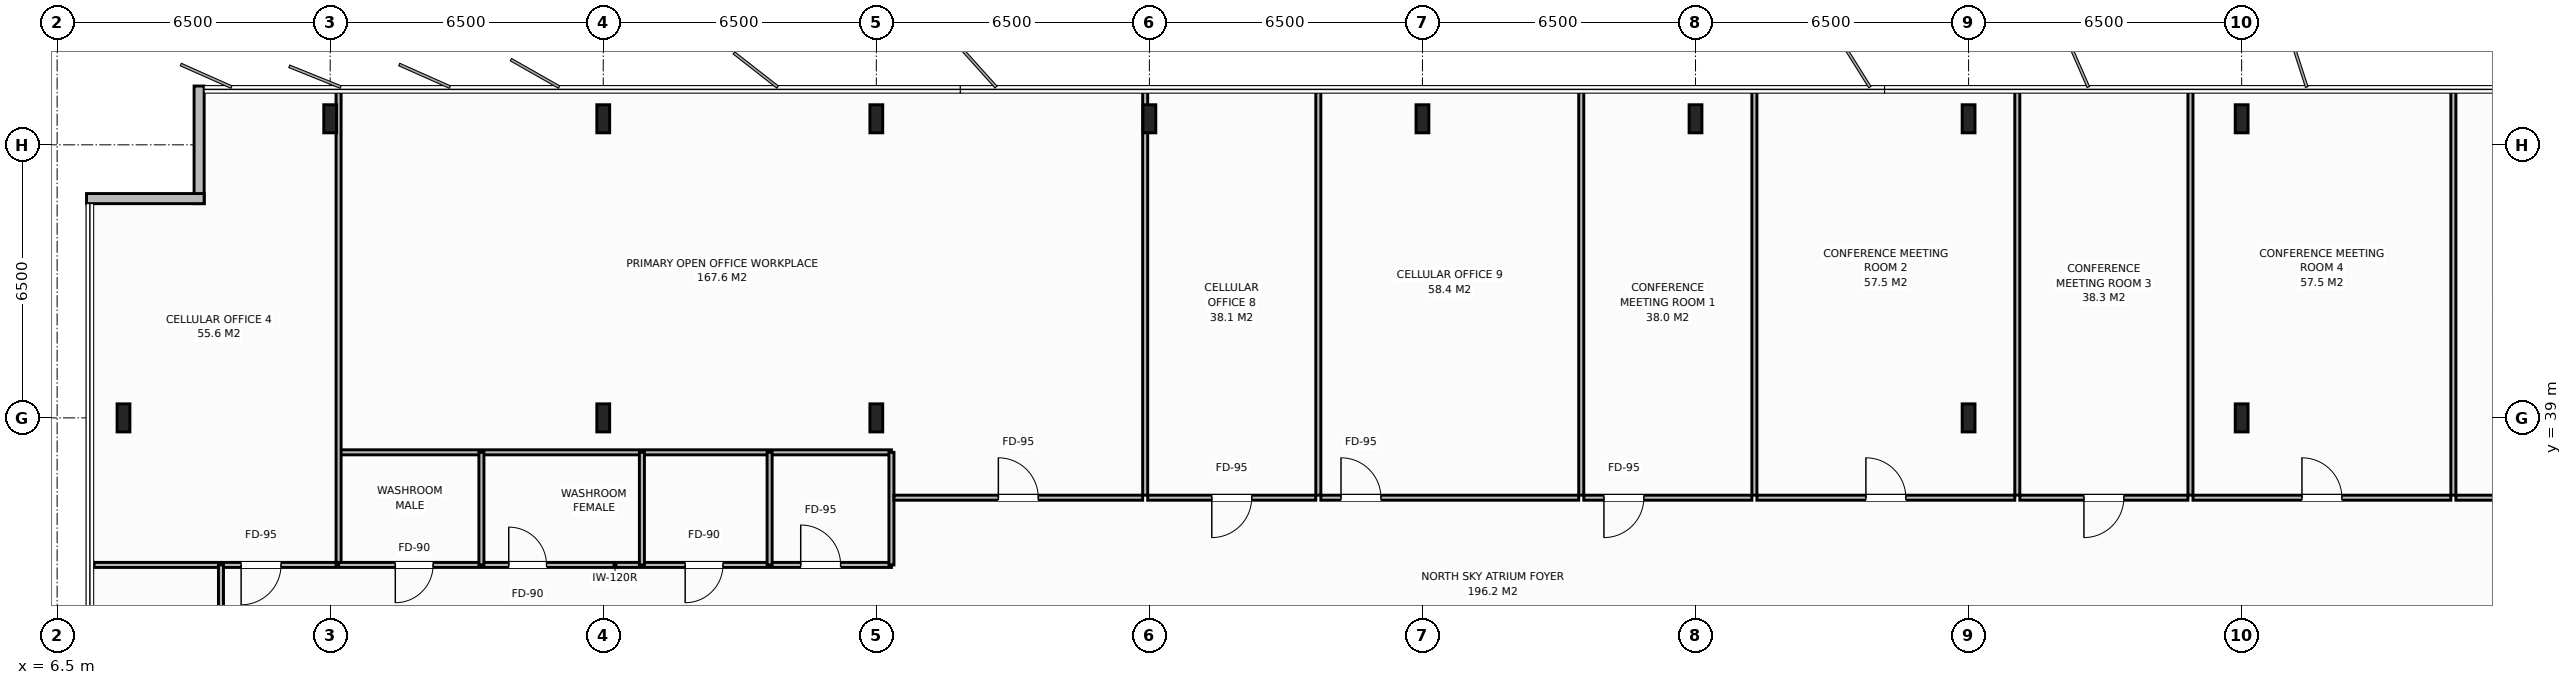
"""IFC4 building model, lengths in metres.
Left out: names, types, materials, properties, quantities, classifications, styles, units other than length and angle.
Written with IfcOpenShell. Run it as: python <this file> out.ifc"""

import sys

from ifc_helpers import new_model, si_unit, direction, frame, frame_2d, origin, origin_2d, place, context, subcontext, project, spatial, rectangle, i_section, extrude, element, fill, save


model = new_model("IFC4")
c1 = context("Model", 3, precision=1e-05, world=origin(), true_north=direction((0.0, 1.0)))
c2 = subcontext(c1, "Body", "Model", "MODEL_VIEW")
j1 = project(units=[si_unit("LENGTHUNIT", "METRE"), si_unit("PLANEANGLEUNIT", "RADIAN")], contexts=[c1])
p1 = place(None, origin())
s1 = spatial("IfcSite", under=j1, at=p1, CompositionType="ELEMENT")
p2 = place(p1, origin())
s2 = spatial("IfcBuilding", under=s1, at=p2, CompositionType="ELEMENT")
p3 = place(p2, frame((0.0, 0.0, 306.4)))
s3 = spatial("IfcBuildingStorey", under=s2, at=p3, CompositionType="ELEMENT", Elevation=306.4)
for number, where, z_axis, x_axis in (
    (1, (19.5, 39.0, 0.0), (0.0, 0.0, 1.0), (1.0, 0.0, 0.0)),
    (2, (58.5, 39.0, 0.0), (0.0, 0.0, 1.0), (1.0, 0.0, 0.0)),
    (3, (26.0, 39.0, 0.0), (0.0, 0.0, 1.0), (1.0, 0.0, 0.0)),
    (4, (52.0, 39.0, 0.0), (0.0, 0.0, 1.0), (1.0, 0.0, 0.0)),
    (5, (13.0, 46.12, 0.0), (0.0, 0.0, 1.0), (1.0, 0.0, 0.0)),
    (6, (19.5, 46.12, 0.0), (0.0, 0.0, 1.0), (1.0, 0.0, 0.0)),
    (7, (26.0, 46.12, 0.0), (0.0, 0.0, 1.0), (1.0, 0.0, 0.0)),
    (8, (32.5, 46.12, 0.0), (0.0, 0.0, 1.0), (1.0, 0.0, 0.0)),
    (9, (39.0, 46.12, 0.0), (0.0, 0.0, 1.0), (1.0, 0.0, 0.0)),
    (10, (45.5, 46.12, 0.0), (0.0, 0.0, 1.0), (1.0, 0.0, 0.0)),
    (11, (52.0, 46.12, 0.0), (0.0, 0.0, 1.0), (1.0, 0.0, 0.0)),
    (12, (58.5, 46.12, 0.0), (0.0, 0.0, 1.0), (1.0, 0.0, 0.0)),
    (13, (8.08, 39.0, 0.0), (0.0, 0.0, 1.0), (1.0, 0.0, 0.0)),
):
    element("IfcColumn", number, at=place(p3, frame(where, z_axis=z_axis, x_axis=x_axis)), inside=s3, PredefinedType="COLUMN", context=c2, shape_type="SweptSolid", body=[
        extrude(i_section(OverallWidth=0.305, OverallDepth=0.668, WebThickness=0.021, FlangeThickness=0.04, at=origin_2d()), origin(), (0.0, 0.0, 1.0), 4.0),
    ])
p4 = place(p3, frame((9.88, 44.1, 0.0), z_axis=(0.0, 0.0, 1.0), x_axis=(0.0, 1.0, 0.0)))
e14 = element("IfcWall", 14, at=p4, inside=s3, PredefinedType="STANDARD", context=c2, shape_type="SweptSolid", body=[
    extrude(rectangle(XDim=2.8, YDim=0.24, at=frame_2d((1.4, 0.0))), origin(), (0.0, 0.0, 1.0), 3.72),
])
p5 = place(p3, frame((7.2, 44.22, 0.0), z_axis=(0.0, 0.0, 1.0), x_axis=(1.0, 0.0, 0.0)))
e15 = element("IfcWall", 15, at=p5, inside=s3, PredefinedType="STANDARD", context=c2, shape_type="SweptSolid", body=[
    extrude(rectangle(XDim=2.8, YDim=0.24, at=frame_2d((1.4, 0.0))), origin(), (0.0, 0.0, 1.0), 3.72),
])
p6 = place(p3, frame((13.2, 35.5, 0.0), z_axis=(0.0, 0.0, 1.0), x_axis=(1.0, 0.0, 0.0)))
e16 = element("IfcWall", 16, at=p6, inside=s3, PredefinedType="PARTITIONING", context=c2, shape_type="SweptSolid", body=[
    extrude(rectangle(XDim=13.16, YDim=0.12, at=frame_2d((6.58, 0.0))), origin(), (0.0, 0.0, 1.0), 3.72),
])
p7 = place(p6, frame((1.35, 0.0, 0.0)))
e17 = element("IfcOpeningElement", 17, at=p7, cuts=e16, PredefinedType="OPENING", context=c2, shape_type="SweptSolid", body=[
    extrude(rectangle(XDim=0.9, YDim=2.15, at=frame_2d((0.45, 1.075))), frame((0.0, 0.07, 0.0), z_axis=(0.0, -1.0, 0.0), x_axis=(1.0, 0.0, 0.0)), (0.0, 0.0, 1.0), 0.14),
])
p8 = place(p6, frame((4.05, 0.0, 0.0)))
e18 = element("IfcOpeningElement", 18, at=p8, cuts=e16, PredefinedType="OPENING", context=c2, shape_type="SweptSolid", body=[
    extrude(rectangle(XDim=0.9, YDim=2.15, at=frame_2d((0.45, 1.075))), frame((0.0, 0.07, 0.0), z_axis=(0.0, -1.0, 0.0), x_axis=(1.0, 0.0, 0.0)), (0.0, 0.0, 1.0), 0.14),
])
p9 = place(p6, frame((8.25, 0.0, 0.0)))
e19 = element("IfcOpeningElement", 19, at=p9, cuts=e16, PredefinedType="OPENING", context=c2, shape_type="SweptSolid", body=[
    extrude(rectangle(XDim=0.9, YDim=2.15, at=frame_2d((0.45, 1.075))), frame((0.0, 0.07, 0.0), z_axis=(0.0, -1.0, 0.0), x_axis=(1.0, 0.0, 0.0)), (0.0, 0.0, 1.0), 0.14),
])
p10 = place(p6, frame((11.0, 0.0, 0.0)))
e20 = element("IfcOpeningElement", 20, at=p10, cuts=e16, PredefinedType="OPENING", context=c2, shape_type="SweptSolid", body=[
    extrude(rectangle(XDim=0.95, YDim=2.15, at=frame_2d((0.475, 1.075))), frame((0.0, 0.07, 0.0), z_axis=(0.0, -1.0, 0.0), x_axis=(1.0, 0.0, 0.0)), (0.0, 0.0, 1.0), 0.14),
])
p11 = place(p3, frame((13.2, 38.18, 0.0), z_axis=(0.0, 0.0, 1.0), x_axis=(1.0, 0.0, 0.0)))
e21 = element("IfcWall", 21, at=p11, inside=s3, PredefinedType="PARTITIONING", context=c2, shape_type="SweptSolid", body=[
    extrude(rectangle(XDim=13.16, YDim=0.12, at=frame_2d((6.58, 0.0))), origin(), (0.0, 0.0, 1.0), 3.72),
])
for number, where, z_axis, x_axis in (
    (22, (16.6, 35.5, 0.0), (0.0, 0.0, 1.0), (0.0, 1.0, 0.0)),
    (23, (20.42, 35.5, 0.0), (0.0, 0.0, 1.0), (0.0, 1.0, 0.0)),
    (24, (23.46, 35.5, 0.0), (0.0, 0.0, 1.0), (0.0, 1.0, 0.0)),
    (25, (26.36, 35.5, 0.0), (0.0, 0.0, 1.0), (0.0, 1.0, 0.0)),
):
    element("IfcWall", number, at=place(p3, frame(where, z_axis=z_axis, x_axis=x_axis)), inside=s3, PredefinedType="PARTITIONING", context=c2, shape_type="SweptSolid", body=[
        extrude(rectangle(XDim=2.68, YDim=0.12, at=frame_2d((1.34, 0.0))), origin(), (0.0, 0.0, 1.0), 3.72),
    ])
p12 = place(p3, frame((13.2, 35.56, 0.0), z_axis=(0.0, 0.0, 1.0), x_axis=(0.0, 1.0, 0.0)))
e26 = element("IfcWall", 26, at=p12, inside=s3, PredefinedType="PARTITIONING", context=c2, shape_type="SweptSolid", body=[
    extrude(rectangle(XDim=11.32, YDim=0.12, at=frame_2d((5.66, 0.0))), origin(), (0.0, 0.0, 1.0), 2.712),
])
p13 = place(p3, frame((7.38, 35.5, 0.0), z_axis=(0.0, 0.0, 1.0), x_axis=(1.0, 0.0, 0.0)))
e27 = element("IfcWall", 27, at=p13, inside=s3, PredefinedType="PARTITIONING", context=c2, shape_type="SweptSolid", body=[
    extrude(rectangle(XDim=5.76, YDim=0.12, at=frame_2d((2.88, 0.0))), origin(), (0.0, 0.0, 1.0), 3.72),
])
p14 = place(p13, frame((3.5, 0.0, 0.0)))
e28 = element("IfcOpeningElement", 28, at=p14, cuts=e27, PredefinedType="OPENING", context=c2, shape_type="SweptSolid", body=[
    extrude(rectangle(XDim=0.95, YDim=2.15, at=frame_2d((0.475, 1.075))), frame((0.0, 0.07, 0.0), z_axis=(0.0, -1.0, 0.0), x_axis=(1.0, 0.0, 0.0)), (0.0, 0.0, 1.0), 0.14),
])
p15 = place(p3, frame((32.4, 37.16, 0.0), z_axis=(0.0, 0.0, 1.0), x_axis=(0.0, 1.0, 0.0)))
e29 = element("IfcWall", 29, at=p15, inside=s3, PredefinedType="PARTITIONING", context=c2, shape_type="SweptSolid", body=[
    extrude(rectangle(XDim=9.72, YDim=0.12, at=frame_2d((4.86, 0.0))), origin(), (0.0, 0.0, 1.0), 2.712),
])
p16 = place(p3, frame((26.42, 37.1, 0.0), z_axis=(0.0, 0.0, 1.0), x_axis=(1.0, 0.0, 0.0)))
e30 = element("IfcWall", 30, at=p16, inside=s3, PredefinedType="PARTITIONING", context=c2, shape_type="SweptSolid", body=[
    extrude(rectangle(XDim=5.92, YDim=0.12, at=frame_2d((2.96, 0.0))), origin(), (0.0, 0.0, 1.0), 3.72),
])
p17 = place(p16, frame((2.485, 0.0, 0.0)))
e31 = element("IfcOpeningElement", 31, at=p17, cuts=e30, PredefinedType="OPENING", context=c2, shape_type="SweptSolid", body=[
    extrude(rectangle(XDim=0.95, YDim=2.15, at=frame_2d((0.475, 1.075))), frame((0.0, 0.07, 0.0), z_axis=(0.0, -1.0, 0.0), x_axis=(1.0, 0.0, 0.0)), (0.0, 0.0, 1.0), 0.14),
])
p18 = place(p3, frame((36.521, 37.16, 0.0), z_axis=(0.0, 0.0, 1.0), x_axis=(0.0, 1.0, 0.0)))
e32 = element("IfcWall", 32, at=p18, inside=s3, PredefinedType="PARTITIONING", context=c2, shape_type="SweptSolid", body=[
    extrude(rectangle(XDim=9.72, YDim=0.12, at=frame_2d((4.86, 0.0))), origin(), (0.0, 0.0, 1.0), 3.72),
])
p19 = place(p3, frame((32.46, 37.1, 0.0), z_axis=(0.0, 0.0, 1.0), x_axis=(1.0, 0.0, 0.0)))
e33 = element("IfcWall", 33, at=p19, inside=s3, PredefinedType="PARTITIONING", context=c2, shape_type="SweptSolid", body=[
    extrude(rectangle(XDim=4.001, YDim=0.12, at=frame_2d((2.001, 0.0))), origin(), (0.0, 0.0, 1.0), 3.72),
])
p20 = place(p19, frame((1.526, 0.0, 0.0)))
e34 = element("IfcOpeningElement", 34, at=p20, cuts=e33, PredefinedType="OPENING", context=c2, shape_type="SweptSolid", body=[
    extrude(rectangle(XDim=0.95, YDim=2.15, at=frame_2d((0.475, 1.075))), frame((0.0, 0.07, 0.0), z_axis=(0.0, -1.0, 0.0), x_axis=(1.0, 0.0, 0.0)), (0.0, 0.0, 1.0), 0.14),
])
p21 = place(p3, frame((42.78, 37.16, 0.0), z_axis=(0.0, 0.0, 1.0), x_axis=(0.0, 1.0, 0.0)))
e35 = element("IfcWall", 35, at=p21, inside=s3, PredefinedType="PARTITIONING", context=c2, shape_type="SweptSolid", body=[
    extrude(rectangle(XDim=9.72, YDim=0.12, at=frame_2d((4.86, 0.0))), origin(), (0.0, 0.0, 1.0), 3.72),
])
p22 = place(p3, frame((36.582, 37.1, 0.0), z_axis=(0.0, 0.0, 1.0), x_axis=(1.0, 0.0, 0.0)))
e36 = element("IfcWall", 36, at=p22, inside=s3, PredefinedType="PARTITIONING", context=c2, shape_type="SweptSolid", body=[
    extrude(rectangle(XDim=6.138, YDim=0.12, at=frame_2d((3.069, 0.0))), origin(), (0.0, 0.0, 1.0), 3.72),
])
p23 = place(p22, frame((0.48, 0.0, 0.0)))
e37 = element("IfcOpeningElement", 37, at=p23, cuts=e36, PredefinedType="OPENING", context=c2, shape_type="SweptSolid", body=[
    extrude(rectangle(XDim=0.95, YDim=2.15, at=frame_2d((0.475, 1.075))), frame((0.0, 0.07, 0.0), z_axis=(0.0, -1.0, 0.0), x_axis=(1.0, 0.0, 0.0)), (0.0, 0.0, 1.0), 0.14),
])
p24 = place(p3, frame((46.902, 37.16, 0.0), z_axis=(0.0, 0.0, 1.0), x_axis=(0.0, 1.0, 0.0)))
e38 = element("IfcWall", 38, at=p24, inside=s3, PredefinedType="PARTITIONING", context=c2, shape_type="SweptSolid", body=[
    extrude(rectangle(XDim=9.72, YDim=0.12, at=frame_2d((4.86, 0.0))), origin(), (0.0, 0.0, 1.0), 3.72),
])
p25 = place(p3, frame((42.84, 37.1, 0.0), z_axis=(0.0, 0.0, 1.0), x_axis=(1.0, 0.0, 0.0)))
e39 = element("IfcWall", 39, at=p25, inside=s3, PredefinedType="PARTITIONING", context=c2, shape_type="SweptSolid", body=[
    extrude(rectangle(XDim=4.001, YDim=0.12, at=frame_2d((2.001, 0.0))), origin(), (0.0, 0.0, 1.0), 3.72),
])
p26 = place(p25, frame((0.48, 0.0, 0.0)))
e40 = element("IfcOpeningElement", 40, at=p26, cuts=e39, PredefinedType="OPENING", context=c2, shape_type="SweptSolid", body=[
    extrude(rectangle(XDim=0.95, YDim=2.15, at=frame_2d((0.475, 1.075))), frame((0.0, 0.07, 0.0), z_axis=(0.0, -1.0, 0.0), x_axis=(1.0, 0.0, 0.0)), (0.0, 0.0, 1.0), 0.14),
])
p27 = place(p3, frame((53.16, 37.16, 0.0), z_axis=(0.0, 0.0, 1.0), x_axis=(0.0, 1.0, 0.0)))
e41 = element("IfcWall", 41, at=p27, inside=s3, PredefinedType="PARTITIONING", context=c2, shape_type="SweptSolid", body=[
    extrude(rectangle(XDim=9.72, YDim=0.12, at=frame_2d((4.86, 0.0))), origin(), (0.0, 0.0, 1.0), 3.72),
])
p28 = place(p3, frame((46.961, 37.1, 0.0), z_axis=(0.0, 0.0, 1.0), x_axis=(1.0, 0.0, 0.0)))
e42 = element("IfcWall", 42, at=p28, inside=s3, PredefinedType="PARTITIONING", context=c2, shape_type="SweptSolid", body=[
    extrude(rectangle(XDim=6.139, YDim=0.12, at=frame_2d((3.069, 0.0))), origin(), (0.0, 0.0, 1.0), 3.72),
])
p29 = place(p28, frame((2.594, 0.0, 0.0)))
e43 = element("IfcOpeningElement", 43, at=p29, cuts=e42, PredefinedType="OPENING", context=c2, shape_type="SweptSolid", body=[
    extrude(rectangle(XDim=0.95, YDim=2.15, at=frame_2d((0.475, 1.075))), frame((0.0, 0.07, 0.0), z_axis=(0.0, -1.0, 0.0), x_axis=(1.0, 0.0, 0.0)), (0.0, 0.0, 1.0), 0.14),
])
p30 = place(p3, frame((57.281, 37.16, 0.0), z_axis=(0.0, 0.0, 1.0), x_axis=(0.0, 1.0, 0.0)))
e44 = element("IfcWall", 44, at=p30, inside=s3, PredefinedType="PARTITIONING", context=c2, shape_type="SweptSolid", body=[
    extrude(rectangle(XDim=9.72, YDim=0.12, at=frame_2d((4.86, 0.0))), origin(), (0.0, 0.0, 1.0), 3.72),
])
p31 = place(p3, frame((53.22, 37.1, 0.0), z_axis=(0.0, 0.0, 1.0), x_axis=(1.0, 0.0, 0.0)))
e45 = element("IfcWall", 45, at=p31, inside=s3, PredefinedType="PARTITIONING", context=c2, shape_type="SweptSolid", body=[
    extrude(rectangle(XDim=4.001, YDim=0.12, at=frame_2d((2.001, 0.0))), origin(), (0.0, 0.0, 1.0), 3.72),
])
p32 = place(p31, frame((1.526, 0.0, 0.0)))
e46 = element("IfcOpeningElement", 46, at=p32, cuts=e45, PredefinedType="OPENING", context=c2, shape_type="SweptSolid", body=[
    extrude(rectangle(XDim=0.95, YDim=2.15, at=frame_2d((0.475, 1.075))), frame((0.0, 0.07, 0.0), z_axis=(0.0, -1.0, 0.0), x_axis=(1.0, 0.0, 0.0)), (0.0, 0.0, 1.0), 0.14),
])
p33 = place(p3, frame((63.54, 37.16, 0.0), z_axis=(0.0, 0.0, 1.0), x_axis=(0.0, 1.0, 0.0)))
e47 = element("IfcWall", 47, at=p33, inside=s3, PredefinedType="PARTITIONING", context=c2, shape_type="SweptSolid", body=[
    extrude(rectangle(XDim=9.72, YDim=0.12, at=frame_2d((4.86, 0.0))), origin(), (0.0, 0.0, 1.0), 3.72),
])
p34 = place(p3, frame((57.342, 37.1, 0.0), z_axis=(0.0, 0.0, 1.0), x_axis=(1.0, 0.0, 0.0)))
e48 = element("IfcWall", 48, at=p34, inside=s3, PredefinedType="PARTITIONING", context=c2, shape_type="SweptSolid", body=[
    extrude(rectangle(XDim=6.138, YDim=0.12, at=frame_2d((3.069, 0.0))), origin(), (0.0, 0.0, 1.0), 3.72),
])
p35 = place(p34, frame((2.594, 0.0, 0.0)))
e49 = element("IfcOpeningElement", 49, at=p35, cuts=e48, PredefinedType="OPENING", context=c2, shape_type="SweptSolid", body=[
    extrude(rectangle(XDim=0.95, YDim=2.15, at=frame_2d((0.475, 1.075))), frame((0.0, 0.07, 0.0), z_axis=(0.0, -1.0, 0.0), x_axis=(1.0, 0.0, 0.0)), (0.0, 0.0, 1.0), 0.14),
])
p36 = place(p3, frame((63.6, 37.1, 0.0), z_axis=(0.0, 0.0, 1.0), x_axis=(1.0, 0.0, 0.0)))
e50 = element("IfcWall", 50, at=p36, inside=s3, PredefinedType="PARTITIONING", context=c2, shape_type="SweptSolid", body=[
    extrude(rectangle(XDim=4.001, YDim=0.12, at=frame_2d((2.001, 0.0))), origin(), (0.0, 0.0, 1.0), 3.72),
])
p37 = place(p36, frame((2.572, 0.0, 0.0)))
e51 = element("IfcOpeningElement", 51, at=p37, cuts=e50, PredefinedType="OPENING", context=c2, shape_type="SweptSolid", body=[
    extrude(rectangle(XDim=0.95, YDim=2.15, at=frame_2d((0.475, 1.075))), frame((0.0, 0.07, 0.0), z_axis=(0.0, -1.0, 0.0), x_axis=(1.0, 0.0, 0.0)), (0.0, 0.0, 1.0), 0.14),
])
p38 = place(p3, frame((10.4, 16.5, 0.0), z_axis=(0.0, 0.0, 1.0), x_axis=(0.0, 1.0, 0.0)))
e52 = element("IfcWall", 52, at=p38, inside=s3, PredefinedType="PARTITIONING", context=c2, shape_type="SweptSolid", body=[
    extrude(rectangle(XDim=19.0, YDim=0.12, at=frame_2d((9.5, 0.0))), origin(), (0.0, 0.0, 1.0), 3.72),
])
p39 = place(p38, frame((9.025, 0.0, 0.0)))
e53 = element("IfcOpeningElement", 53, at=p39, cuts=e52, PredefinedType="OPENING", context=c2, shape_type="SweptSolid", body=[
    extrude(rectangle(XDim=0.95, YDim=2.15, at=frame_2d((0.475, 1.075))), frame((0.0, 0.07, 0.0), z_axis=(0.0, -1.0, 0.0), x_axis=(1.0, 0.0, 0.0)), (0.0, 0.0, 1.0), 0.14),
])
p40 = place(p7, origin())
e54 = element("IfcDoor", 54, at=p40, inside=s3, OperationType="SINGLE_SWING_RIGHT", PredefinedType="DOOR", context=c2, shape_type="SweptSolid", body=[
    extrude(rectangle(XDim=0.9, YDim=2.15, at=frame_2d((0.45, 1.075))), frame((0.0, 0.025, 0.0), z_axis=(0.0, -1.0, 0.0), x_axis=(1.0, 0.0, 0.0)), (0.0, 0.0, 1.0), 0.05),
])
fill(e17, e54)
p41 = place(p8, origin())
e55 = element("IfcDoor", 55, at=p41, inside=s3, OperationType="SINGLE_SWING_LEFT", PredefinedType="DOOR", context=c2, shape_type="SweptSolid", body=[
    extrude(rectangle(XDim=0.9, YDim=2.15, at=frame_2d((0.45, 1.075))), frame((0.0, 0.025, 0.0), z_axis=(0.0, -1.0, 0.0), x_axis=(1.0, 0.0, 0.0)), (0.0, 0.0, 1.0), 0.05),
])
fill(e18, e55)
p42 = place(p9, origin())
e56 = element("IfcDoor", 56, at=p42, inside=s3, OperationType="SINGLE_SWING_RIGHT", PredefinedType="DOOR", context=c2, shape_type="SweptSolid", body=[
    extrude(rectangle(XDim=0.9, YDim=2.15, at=frame_2d((0.45, 1.075))), frame((0.0, 0.025, 0.0), z_axis=(0.0, -1.0, 0.0), x_axis=(1.0, 0.0, 0.0)), (0.0, 0.0, 1.0), 0.05),
])
fill(e19, e56)
p43 = place(p10, origin())
e57 = element("IfcDoor", 57, at=p43, inside=s3, OperationType="SINGLE_SWING_LEFT", PredefinedType="DOOR", context=c2, shape_type="SweptSolid", body=[
    extrude(rectangle(XDim=0.95, YDim=2.15, at=frame_2d((0.475, 1.075))), frame((0.0, 0.025, 0.0), z_axis=(0.0, -1.0, 0.0), x_axis=(1.0, 0.0, 0.0)), (0.0, 0.0, 1.0), 0.05),
])
fill(e20, e57)
p44 = place(p14, origin())
e58 = element("IfcDoor", 58, at=p44, inside=s3, OperationType="SINGLE_SWING_RIGHT", PredefinedType="DOOR", context=c2, shape_type="SweptSolid", body=[
    extrude(rectangle(XDim=0.95, YDim=2.15, at=frame_2d((0.475, 1.075))), frame((0.0, 0.025, 0.0), z_axis=(0.0, -1.0, 0.0), x_axis=(1.0, 0.0, 0.0)), (0.0, 0.0, 1.0), 0.05),
])
fill(e28, e58)
p45 = place(p17, origin())
e59 = element("IfcDoor", 59, at=p45, inside=s3, OperationType="SINGLE_SWING_LEFT", PredefinedType="DOOR", context=c2, shape_type="SweptSolid", body=[
    extrude(rectangle(XDim=0.95, YDim=2.15, at=frame_2d((0.475, 1.075))), frame((0.0, 0.025, 0.0), z_axis=(0.0, -1.0, 0.0), x_axis=(1.0, 0.0, 0.0)), (0.0, 0.0, 1.0), 0.05),
])
fill(e31, e59)
p46 = place(p20, origin())
e60 = element("IfcDoor", 60, at=p46, inside=s3, OperationType="SINGLE_SWING_RIGHT", PredefinedType="DOOR", context=c2, shape_type="SweptSolid", body=[
    extrude(rectangle(XDim=0.95, YDim=2.15, at=frame_2d((0.475, 1.075))), frame((0.0, 0.025, 0.0), z_axis=(0.0, -1.0, 0.0), x_axis=(1.0, 0.0, 0.0)), (0.0, 0.0, 1.0), 0.05),
])
fill(e34, e60)
p47 = place(p23, origin())
e61 = element("IfcDoor", 61, at=p47, inside=s3, OperationType="SINGLE_SWING_LEFT", PredefinedType="DOOR", context=c2, shape_type="SweptSolid", body=[
    extrude(rectangle(XDim=0.95, YDim=2.15, at=frame_2d((0.475, 1.075))), frame((0.0, 0.025, 0.0), z_axis=(0.0, -1.0, 0.0), x_axis=(1.0, 0.0, 0.0)), (0.0, 0.0, 1.0), 0.05),
])
fill(e37, e61)
p48 = place(p26, origin())
e62 = element("IfcDoor", 62, at=p48, inside=s3, OperationType="SINGLE_SWING_RIGHT", PredefinedType="DOOR", context=c2, shape_type="SweptSolid", body=[
    extrude(rectangle(XDim=0.95, YDim=2.15, at=frame_2d((0.475, 1.075))), frame((0.0, 0.025, 0.0), z_axis=(0.0, -1.0, 0.0), x_axis=(1.0, 0.0, 0.0)), (0.0, 0.0, 1.0), 0.05),
])
fill(e40, e62)
p49 = place(p29, origin())
e63 = element("IfcDoor", 63, at=p49, inside=s3, OperationType="SINGLE_SWING_LEFT", PredefinedType="DOOR", context=c2, shape_type="SweptSolid", body=[
    extrude(rectangle(XDim=0.95, YDim=2.15, at=frame_2d((0.475, 1.075))), frame((0.0, 0.025, 0.0), z_axis=(0.0, -1.0, 0.0), x_axis=(1.0, 0.0, 0.0)), (0.0, 0.0, 1.0), 0.05),
])
fill(e43, e63)
p50 = place(p32, origin())
e64 = element("IfcDoor", 64, at=p50, inside=s3, OperationType="SINGLE_SWING_RIGHT", PredefinedType="DOOR", context=c2, shape_type="SweptSolid", body=[
    extrude(rectangle(XDim=0.95, YDim=2.15, at=frame_2d((0.475, 1.075))), frame((0.0, 0.025, 0.0), z_axis=(0.0, -1.0, 0.0), x_axis=(1.0, 0.0, 0.0)), (0.0, 0.0, 1.0), 0.05),
])
fill(e46, e64)
p51 = place(p35, origin())
e65 = element("IfcDoor", 65, at=p51, inside=s3, OperationType="SINGLE_SWING_LEFT", PredefinedType="DOOR", context=c2, shape_type="SweptSolid", body=[
    extrude(rectangle(XDim=0.95, YDim=2.15, at=frame_2d((0.475, 1.075))), frame((0.0, 0.025, 0.0), z_axis=(0.0, -1.0, 0.0), x_axis=(1.0, 0.0, 0.0)), (0.0, 0.0, 1.0), 0.05),
])
fill(e49, e65)
save(model, sys.argv[1])
